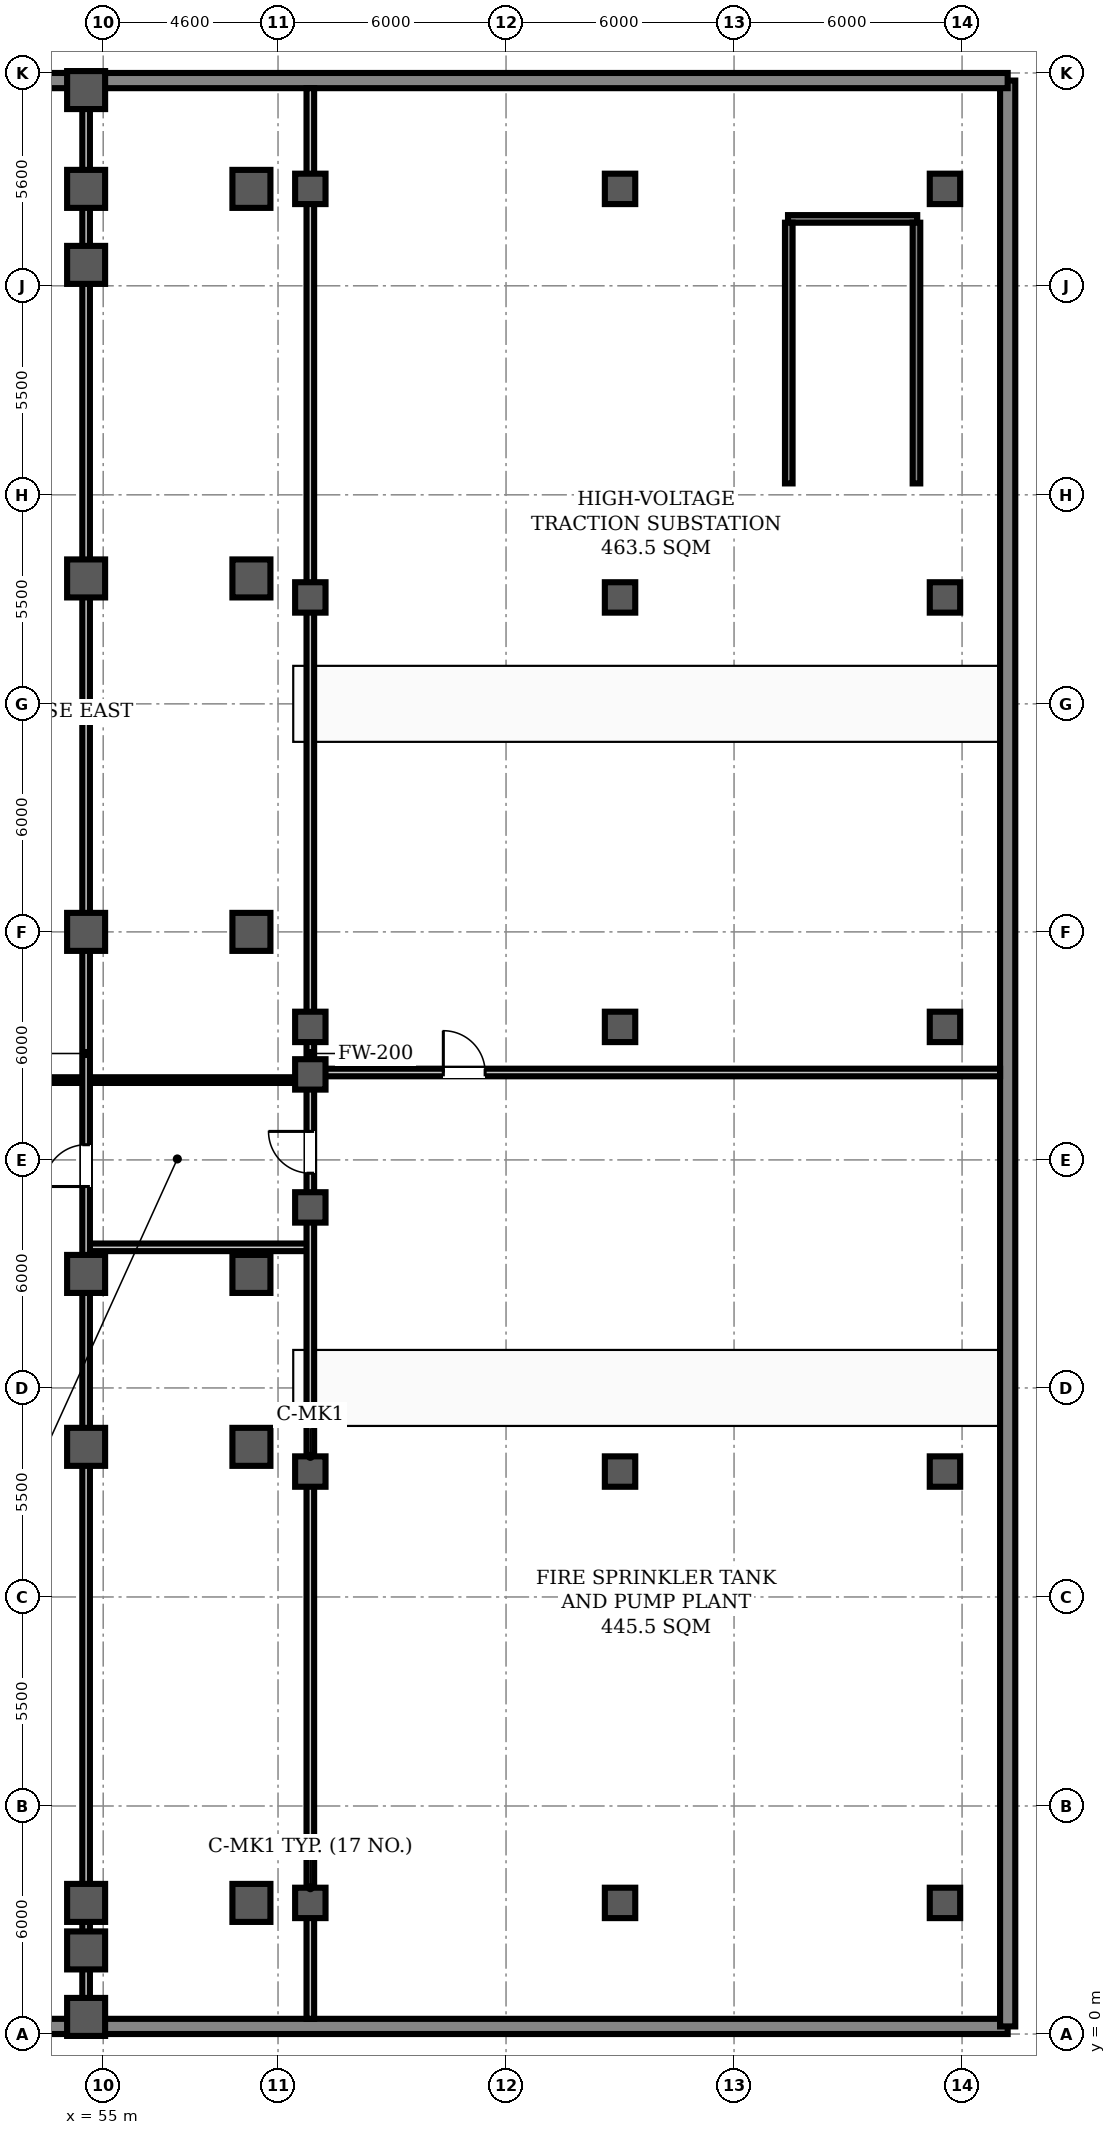
"""IFC4 building model, lengths in metres.
Left out: names, types, materials, properties, quantities, classifications, styles, units other than length and angle.
Written with IfcOpenShell. Run it as: python <this file> out.ifc"""

import sys

from ifc_helpers import new_model, si_unit, direction, frame, frame_2d, origin, origin_2d, place, context, subcontext, project, spatial, rectangle, extrude, element, fill, save


model = new_model("IFC4")
c1 = context("Model", 3, precision=1e-05, world=origin(), true_north=direction((0.0, 1.0)))
c2 = subcontext(c1, "Body", "Model", "MODEL_VIEW")
j1 = project(units=[si_unit("LENGTHUNIT", "METRE"), si_unit("PLANEANGLEUNIT", "RADIAN")], contexts=[c1])
p1 = place(None, origin())
s1 = spatial("IfcSite", under=j1, at=p1, CompositionType="ELEMENT")
p2 = place(p1, origin())
s2 = spatial("IfcBuilding", under=s1, at=p2, CompositionType="ELEMENT")
p3 = place(p2, frame((0.0, 0.0, -15.6)))
s3 = spatial("IfcBuildingStorey", under=s2, at=p3, CompositionType="ELEMENT", Elevation=-15.6)
for number, where, z_axis, x_axis in (
    (1, (54.55, 0.45, 0.0), (0.0, 0.0, 1.0), (1.0, 0.0, 0.0)),
    (2, (54.55, 2.2, 0.0), (0.0, 0.0, 1.0), (1.0, 0.0, 0.0)),
    (3, (54.55, 3.45, 0.0), (0.0, 0.0, 1.0), (1.0, 0.0, 0.0)),
    (4, (54.55, 15.45, 0.0), (0.0, 0.0, 1.0), (1.0, 0.0, 0.0)),
    (5, (54.55, 20.0, 0.0), (0.0, 0.0, 1.0), (1.0, 0.0, 0.0)),
    (6, (54.55, 29.0, 0.0), (0.0, 0.0, 1.0), (1.0, 0.0, 0.0)),
    (7, (54.55, 38.3, 0.0), (0.0, 0.0, 1.0), (1.0, 0.0, 0.0)),
    (8, (54.55, 46.55, 0.0), (0.0, 0.0, 1.0), (1.0, 0.0, 0.0)),
    (9, (54.55, 48.55, 0.0), (0.0, 0.0, 1.0), (1.0, 0.0, 0.0)),
    (10, (54.55, 51.15, 0.0), (0.0, 0.0, 1.0), (1.0, 0.0, 0.0)),
    (11, (58.9, 3.45, 0.0), (0.0, 0.0, 1.0), (1.0, 0.0, 0.0)),
    (12, (58.9, 15.45, 0.0), (0.0, 0.0, 1.0), (1.0, 0.0, 0.0)),
    (13, (58.9, 20.0, 0.0), (0.0, 0.0, 1.0), (1.0, 0.0, 0.0)),
    (14, (58.9, 29.0, 0.0), (0.0, 0.0, 1.0), (1.0, 0.0, 0.0)),
    (15, (58.9, 38.3, 0.0), (0.0, 0.0, 1.0), (1.0, 0.0, 0.0)),
    (16, (58.9, 48.55, 0.0), (0.0, 0.0, 1.0), (1.0, 0.0, 0.0)),
):
    element("IfcColumn", number, at=place(p3, frame(where, z_axis=z_axis, x_axis=x_axis)), inside=s3, PredefinedType="COLUMN", context=c2, shape_type="SweptSolid", body=[
        extrude(rectangle(XDim=1.0, YDim=1.0, at=origin_2d()), origin(), (0.0, 0.0, 1.0), 5.4),
    ])
for number, where, z_axis, x_axis in (
    (17, (60.45, 3.45, 0.0), (0.0, 0.0, 1.0), (1.0, 0.0, 0.0)),
    (18, (60.45, 14.8, 0.0), (0.0, 0.0, 1.0), (1.0, 0.0, 0.0)),
    (19, (60.45, 21.75, 0.0), (0.0, 0.0, 1.0), (1.0, 0.0, 0.0)),
    (20, (60.45, 25.25, 0.0), (0.0, 0.0, 1.0), (1.0, 0.0, 0.0)),
    (21, (60.45, 26.5, 0.0), (0.0, 0.0, 1.0), (1.0, 0.0, 0.0)),
    (22, (60.45, 37.8, 0.0), (0.0, 0.0, 1.0), (1.0, 0.0, 0.0)),
    (23, (60.45, 48.55, 0.0), (0.0, 0.0, 1.0), (1.0, 0.0, 0.0)),
    (24, (68.6, 3.45, 0.0), (0.0, 0.0, 1.0), (1.0, 0.0, 0.0)),
    (25, (68.6, 14.8, 0.0), (0.0, 0.0, 1.0), (1.0, 0.0, 0.0)),
    (26, (68.6, 26.5, 0.0), (0.0, 0.0, 1.0), (1.0, 0.0, 0.0)),
    (27, (68.6, 37.8, 0.0), (0.0, 0.0, 1.0), (1.0, 0.0, 0.0)),
    (28, (68.6, 48.55, 0.0), (0.0, 0.0, 1.0), (1.0, 0.0, 0.0)),
    (29, (77.15, 3.45, 0.0), (0.0, 0.0, 1.0), (1.0, 0.0, 0.0)),
    (30, (77.15, 14.8, 0.0), (0.0, 0.0, 1.0), (1.0, 0.0, 0.0)),
    (31, (77.15, 26.5, 0.0), (0.0, 0.0, 1.0), (1.0, 0.0, 0.0)),
    (32, (77.15, 37.8, 0.0), (0.0, 0.0, 1.0), (1.0, 0.0, 0.0)),
    (33, (77.15, 48.55, 0.0), (0.0, 0.0, 1.0), (1.0, 0.0, 0.0)),
):
    element("IfcColumn", number, at=place(p3, frame(where, z_axis=z_axis, x_axis=x_axis)), inside=s3, PredefinedType="COLUMN", context=c2, shape_type="SweptSolid", body=[
        extrude(rectangle(XDim=0.8, YDim=0.8, at=origin_2d()), origin(), (0.0, 0.0, 1.0), 5.4),
    ])
p4 = place(p3, frame((-1.6, 0.2, 0.0), z_axis=(0.0, 0.0, 1.0), x_axis=(1.0, 0.0, 0.0)))
e34 = element("IfcWall", 34, at=p4, inside=s3, PredefinedType="SOLIDWALL", context=c2, shape_type="SweptSolid", body=[
    extrude(rectangle(XDim=80.4, YDim=0.4, at=frame_2d((40.2, 0.0))), origin(), (0.0, 0.0, 1.0), 5.12),
])
p5 = place(p3, frame((78.8, 0.2, 0.0), z_axis=(0.0, 0.0, 1.0), x_axis=(0.0, 1.0, 0.0)))
e35 = element("IfcWall", 35, at=p5, inside=s3, PredefinedType="SOLIDWALL", context=c2, shape_type="SweptSolid", body=[
    extrude(rectangle(XDim=51.2, YDim=0.4, at=frame_2d((25.6, 0.0))), origin(), (0.0, 0.0, 1.0), 5.12),
])
p6 = place(p3, frame((78.8, 51.4, 0.0), z_axis=(0.0, 0.0, 1.0), x_axis=(-1.0, 0.0, 0.0)))
e36 = element("IfcWall", 36, at=p6, inside=s3, PredefinedType="SOLIDWALL", context=c2, shape_type="SweptSolid", body=[
    extrude(rectangle(XDim=80.4, YDim=0.4, at=frame_2d((40.2, 0.0))), origin(), (0.0, 0.0, 1.0), 5.12),
])
p7 = place(p3, frame((73.02, 47.76, 0.0), z_axis=(0.0, 0.0, 1.0), x_axis=(1.0, 0.0, 0.0)))
e37 = element("IfcWall", 37, at=p7, inside=s3, PredefinedType="STANDARD", context=c2, shape_type="SweptSolid", body=[
    extrude(rectangle(XDim=3.4, YDim=0.2, at=frame_2d((1.7, 0.0))), origin(), (0.0, 0.0, 1.0), 5.12),
])
for number, where, z_axis, x_axis in (
    (38, (73.04, 40.8, 0.0), (0.0, 0.0, 1.0), (0.0, 1.0, 0.0)),
    (39, (76.4, 40.8, 0.0), (0.0, 0.0, 1.0), (0.0, 1.0, 0.0)),
):
    element("IfcWall", number, at=place(p3, frame(where, z_axis=z_axis, x_axis=x_axis)), inside=s3, PredefinedType="STANDARD", context=c2, shape_type="SweptSolid", body=[
        extrude(rectangle(XDim=6.86, YDim=0.2, at=frame_2d((3.43, 0.0))), origin(), (0.0, 0.0, 1.0), 5.12),
    ])
p8 = place(p3, frame((-1.4, 25.1, 0.0), z_axis=(0.0, 0.0, 1.0), x_axis=(1.0, 0.0, 0.0)))
e40 = element("IfcWall", 40, at=p8, inside=s3, PredefinedType="PARTITIONING", context=c2, shape_type="SweptSolid", body=[
    extrude(rectangle(XDim=61.85, YDim=0.15, at=frame_2d((30.925, 0.0))), origin(), (0.0, 0.0, 1.0), 4.4),
])
p9 = place(p8, frame((28.0, 0.0, 0.0)))
e41 = element("IfcOpeningElement", 41, at=p9, cuts=e40, PredefinedType="OPENING", context=c2, shape_type="SweptSolid", body=[
    extrude(rectangle(XDim=1.8, YDim=2.08, at=frame_2d((0.9, 1.04))), frame((0.0, 0.085, 0.0), z_axis=(0.0, -1.0, 0.0), x_axis=(1.0, 0.0, 0.0)), (0.0, 0.0, 1.0), 0.17),
])
p10 = place(p3, frame((54.55, 20.7, 0.0), z_axis=(0.0, 0.0, 1.0), x_axis=(1.0, 0.0, 0.0)))
e42 = element("IfcWall", 42, at=p10, inside=s3, PredefinedType="STANDARD", context=c2, shape_type="SweptSolid", body=[
    extrude(rectangle(XDim=5.9, YDim=0.2, at=frame_2d((2.95, 0.0))), origin(), (0.0, 0.0, 1.0), 4.4),
])
p11 = place(p3, frame((60.45, 25.3, 0.0), z_axis=(0.0, 0.0, 1.0), x_axis=(1.0, 0.0, 0.0)))
e43 = element("IfcWall", 43, at=p11, inside=s3, PredefinedType="STANDARD", context=c2, shape_type="SweptSolid", body=[
    extrude(rectangle(XDim=18.15, YDim=0.2, at=frame_2d((9.075, 0.0))), origin(), (0.0, 0.0, 1.0), 4.5),
])
p12 = place(p11, frame((3.5, 0.0, 0.0)))
e44 = element("IfcOpeningElement", 44, at=p12, cuts=e43, PredefinedType="OPENING", context=c2, shape_type="SweptSolid", body=[
    extrude(rectangle(XDim=1.1, YDim=2.08, at=frame_2d((0.55, 1.04))), frame((0.0, 0.11, 0.0), z_axis=(0.0, -1.0, 0.0), x_axis=(1.0, 0.0, 0.0)), (0.0, 0.0, 1.0), 0.22),
])
p13 = place(p3, frame((54.55, 0.4, 0.0), z_axis=(0.0, 0.0, 1.0), x_axis=(0.0, 1.0, 0.0)))
e45 = element("IfcWall", 45, at=p13, inside=s3, PredefinedType="STANDARD", context=c2, shape_type="SweptSolid", body=[
    extrude(rectangle(XDim=50.8, YDim=0.2, at=frame_2d((25.4, 0.0))), origin(), (0.0, 0.0, 1.0), 4.3),
])
p14 = place(p13, frame((21.9, 0.0, 0.0)))
e46 = element("IfcOpeningElement", 46, at=p14, cuts=e45, PredefinedType="OPENING", context=c2, shape_type="SweptSolid", body=[
    extrude(rectangle(XDim=1.1, YDim=2.08, at=frame_2d((0.55, 1.04))), frame((0.0, 0.11, 0.0), z_axis=(0.0, -1.0, 0.0), x_axis=(1.0, 0.0, 0.0)), (0.0, 0.0, 1.0), 0.22),
])
p15 = place(p3, frame((60.45, 0.4, 0.0), z_axis=(0.0, 0.0, 1.0), x_axis=(0.0, 1.0, 0.0)))
e47 = element("IfcWall", 47, at=p15, inside=s3, PredefinedType="STANDARD", context=c2, shape_type="SweptSolid", body=[
    extrude(rectangle(XDim=50.8, YDim=0.2, at=frame_2d((25.4, 0.0))), origin(), (0.0, 0.0, 1.0), 4.2),
])
p16 = place(p15, frame((22.25, 0.0, 0.0)))
e48 = element("IfcOpeningElement", 48, at=p16, cuts=e47, PredefinedType="OPENING", context=c2, shape_type="SweptSolid", body=[
    extrude(rectangle(XDim=1.1, YDim=2.08, at=frame_2d((0.55, 1.04))), frame((0.0, 0.11, 0.0), z_axis=(0.0, -1.0, 0.0), x_axis=(1.0, 0.0, 0.0)), (0.0, 0.0, 1.0), 0.22),
])
p17 = place(p14, origin())
e49 = element("IfcDoor", 49, at=p17, inside=s3, OperationType="SINGLE_SWING_LEFT", PredefinedType="DOOR", context=c2, shape_type="SweptSolid", body=[
    extrude(rectangle(XDim=1.1, YDim=2.08, at=frame_2d((0.55, 1.04))), frame((0.0, 0.025, 0.0), z_axis=(0.0, -1.0, 0.0), x_axis=(1.0, 0.0, 0.0)), (0.0, 0.0, 1.0), 0.05),
])
fill(e46, e49)
p18 = place(p16, origin())
e50 = element("IfcDoor", 50, at=p18, inside=s3, OperationType="SINGLE_SWING_RIGHT", PredefinedType="DOOR", context=c2, shape_type="SweptSolid", body=[
    extrude(rectangle(XDim=1.1, YDim=2.08, at=frame_2d((0.55, 1.04))), frame((0.0, 0.025, 0.0), z_axis=(0.0, -1.0, 0.0), x_axis=(1.0, 0.0, 0.0)), (0.0, 0.0, 1.0), 0.05),
])
fill(e48, e50)
p19 = place(p12, origin())
e51 = element("IfcDoor", 51, at=p19, inside=s3, OperationType="SINGLE_SWING_LEFT", PredefinedType="DOOR", context=c2, shape_type="SweptSolid", body=[
    extrude(rectangle(XDim=1.1, YDim=2.08, at=frame_2d((0.55, 1.04))), frame((0.0, 0.025, 0.0), z_axis=(0.0, -1.0, 0.0), x_axis=(1.0, 0.0, 0.0)), (0.0, 0.0, 1.0), 0.05),
])
fill(e44, e51)
save(model, sys.argv[1])
